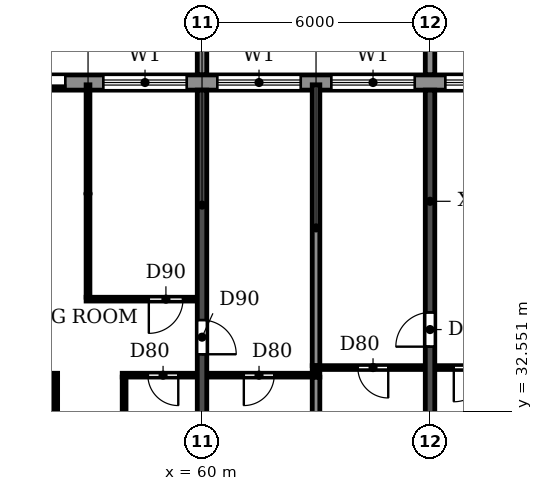
"""IFC4 building model, lengths in metres.
Left out: names, types, materials, properties, quantities, classifications, styles, units other than length and angle.
Written with IfcOpenShell. Run it as: python <this file> out.ifc"""

import sys

from ifc_helpers import new_model, si_unit, direction, frame, frame_2d, origin, place, context, subcontext, project, spatial, polyline, rectangle, outline, extrude, source, transform, mapped, element, fill, save


model = new_model("IFC4")
c1 = context("Model", 3, precision=1e-05, world=origin(), true_north=direction((0.0, 1.0)))
c2 = subcontext(c1, "Body", "Model", "MODEL_VIEW")
j1 = project(units=[si_unit("LENGTHUNIT", "METRE"), si_unit("PLANEANGLEUNIT", "RADIAN")], contexts=[c1])
p1 = place(None, origin())
s1 = spatial("IfcSite", under=j1, at=p1, CompositionType="ELEMENT")
p2 = place(p1, origin())
s2 = spatial("IfcBuilding", under=s1, at=p2, CompositionType="ELEMENT")
p3 = place(p2, frame((0.0, 0.0, 257.7)))
s3 = spatial("IfcBuildingStorey", under=s2, at=p3, CompositionType="ELEMENT", Elevation=257.7)
p4 = place(p3, frame((60.0, 30.5, 0.0), z_axis=(0.0, 0.0, 1.0), x_axis=(0.0, 1.0, 0.0)))
e1 = element("IfcWall", 1, at=p4, inside=s3, PredefinedType="SHEAR", context=c2, shape_type="SweptSolid", body=[
    extrude(rectangle(XDim=10.5, YDim=0.25, at=frame_2d((5.25, 0.0))), origin(), (0.0, 0.0, 1.0), 3.0),
])
p5 = place(p4, frame((3.55, 0.0, 0.0)))
e2 = element("IfcOpeningElement", 2, at=p5, cuts=e1, PredefinedType="OPENING", context=c2, shape_type="SweptSolid", body=[
    extrude(rectangle(XDim=0.9, YDim=2.1, at=frame_2d((0.45, 1.05))), frame((0.0, 0.135, 0.0), z_axis=(0.0, -1.0, 0.0), x_axis=(1.0, 0.0, 0.0)), (0.0, 0.0, 1.0), 0.27),
])
p6 = place(p3, frame((66.0, 30.5, 0.0), z_axis=(0.0, 0.0, 1.0), x_axis=(0.0, 1.0, 0.0)))
e3 = element("IfcWall", 3, at=p6, inside=s3, PredefinedType="SHEAR", context=c2, shape_type="SweptSolid", body=[
    extrude(rectangle(XDim=10.5, YDim=0.25, at=frame_2d((5.25, 0.0))), origin(), (0.0, 0.0, 1.0), 3.0),
])
p7 = place(p6, frame((3.75, 0.0, 0.0)))
e4 = element("IfcOpeningElement", 4, at=p7, cuts=e3, PredefinedType="OPENING", context=c2, shape_type="SweptSolid", body=[
    extrude(rectangle(XDim=0.9, YDim=2.1, at=frame_2d((0.45, 1.05))), frame((0.0, 0.135, 0.0), z_axis=(0.0, -1.0, 0.0), x_axis=(1.0, 0.0, 0.0)), (0.0, 0.0, 1.0), 0.27),
])
p8 = place(p3, frame((79.317, 41.2, 0.0), z_axis=(0.0, 0.0, 1.0), x_axis=(-1.0, 0.0, 0.0)))
e5 = element("IfcWall", 5, at=p8, inside=s3, PredefinedType="STANDARD", context=c2, shape_type="SweptSolid", body=[
    extrude(rectangle(XDim=56.634, YDim=0.4, at=frame_2d((28.317, 0.0))), origin(), (0.0, 0.0, 1.0), 3.0),
])
p9 = place(p8, frame((52.717, 0.0, 0.9)))
e6 = element("IfcOpeningElement", 6, at=p9, cuts=e5, PredefinedType="OPENING", context=c2, shape_type="SweptSolid", body=[
    extrude(rectangle(XDim=2.2, YDim=1.5, at=frame_2d((1.1, 0.75))), frame((0.0, 0.21, 0.0), z_axis=(0.0, -1.0, 0.0), x_axis=(1.0, 0.0, 0.0)), (0.0, 0.0, 1.0), 0.42),
])
p10 = place(p8, frame((49.717, 0.0, 0.9)))
e7 = element("IfcOpeningElement", 7, at=p10, cuts=e5, PredefinedType="OPENING", context=c2, shape_type="SweptSolid", body=[
    extrude(rectangle(XDim=2.2, YDim=1.5, at=frame_2d((1.1, 0.75))), frame((0.0, 0.21, 0.0), z_axis=(0.0, -1.0, 0.0), x_axis=(1.0, 0.0, 0.0)), (0.0, 0.0, 1.0), 0.42),
])
p11 = place(p8, frame((46.717, 0.0, 0.9)))
e8 = element("IfcOpeningElement", 8, at=p11, cuts=e5, PredefinedType="OPENING", context=c2, shape_type="SweptSolid", body=[
    extrude(rectangle(XDim=2.2, YDim=1.5, at=frame_2d((1.1, 0.75))), frame((0.0, 0.21, 0.0), z_axis=(0.0, -1.0, 0.0), x_axis=(1.0, 0.0, 0.0)), (0.0, 0.0, 1.0), 0.42),
])
p12 = place(p8, frame((43.917, 0.0, 0.0)))
e9 = element("IfcOpeningElement", 9, at=p12, cuts=e5, PredefinedType="OPENING", context=c2, shape_type="SweptSolid", body=[
    extrude(rectangle(XDim=1.8, YDim=2.4, at=frame_2d((0.9, 1.2))), frame((0.0, 0.21, 0.0), z_axis=(0.0, -1.0, 0.0), x_axis=(1.0, 0.0, 0.0)), (0.0, 0.0, 1.0), 0.42),
])
p13 = place(p8, frame((40.717, 0.0, 0.9)))
e10 = element("IfcOpeningElement", 10, at=p13, cuts=e5, PredefinedType="OPENING", context=c2, shape_type="SweptSolid", body=[
    extrude(rectangle(XDim=2.2, YDim=1.5, at=frame_2d((1.1, 0.75))), frame((0.0, 0.21, 0.0), z_axis=(0.0, -1.0, 0.0), x_axis=(1.0, 0.0, 0.0)), (0.0, 0.0, 1.0), 0.42),
])
p14 = place(p8, frame((37.917, 0.0, 0.0)))
e11 = element("IfcOpeningElement", 11, at=p14, cuts=e5, PredefinedType="OPENING", context=c2, shape_type="SweptSolid", body=[
    extrude(rectangle(XDim=1.8, YDim=2.4, at=frame_2d((0.9, 1.2))), frame((0.0, 0.21, 0.0), z_axis=(0.0, -1.0, 0.0), x_axis=(1.0, 0.0, 0.0)), (0.0, 0.0, 1.0), 0.42),
])
p15 = place(p8, frame((34.717, 0.0, 0.9)))
e12 = element("IfcOpeningElement", 12, at=p15, cuts=e5, PredefinedType="OPENING", context=c2, shape_type="SweptSolid", body=[
    extrude(rectangle(XDim=2.2, YDim=1.5, at=frame_2d((1.1, 0.75))), frame((0.0, 0.21, 0.0), z_axis=(0.0, -1.0, 0.0), x_axis=(1.0, 0.0, 0.0)), (0.0, 0.0, 1.0), 0.42),
])
p16 = place(p8, frame((31.717, 0.0, 0.9)))
e13 = element("IfcOpeningElement", 13, at=p16, cuts=e5, PredefinedType="OPENING", context=c2, shape_type="SweptSolid", body=[
    extrude(rectangle(XDim=2.2, YDim=1.5, at=frame_2d((1.1, 0.75))), frame((0.0, 0.21, 0.0), z_axis=(0.0, -1.0, 0.0), x_axis=(1.0, 0.0, 0.0)), (0.0, 0.0, 1.0), 0.42),
])
p17 = place(p8, frame((28.717, 0.0, 0.9)))
e14 = element("IfcOpeningElement", 14, at=p17, cuts=e5, PredefinedType="OPENING", context=c2, shape_type="SweptSolid", body=[
    extrude(rectangle(XDim=2.2, YDim=1.5, at=frame_2d((1.1, 0.75))), frame((0.0, 0.21, 0.0), z_axis=(0.0, -1.0, 0.0), x_axis=(1.0, 0.0, 0.0)), (0.0, 0.0, 1.0), 0.42),
])
p18 = place(p8, frame((25.917, 0.0, 0.0)))
e15 = element("IfcOpeningElement", 15, at=p18, cuts=e5, PredefinedType="OPENING", context=c2, shape_type="SweptSolid", body=[
    extrude(rectangle(XDim=1.8, YDim=2.4, at=frame_2d((0.9, 1.2))), frame((0.0, 0.21, 0.0), z_axis=(0.0, -1.0, 0.0), x_axis=(1.0, 0.0, 0.0)), (0.0, 0.0, 1.0), 0.42),
])
p19 = place(p8, frame((22.917, 0.0, 0.0)))
e16 = element("IfcOpeningElement", 16, at=p19, cuts=e5, PredefinedType="OPENING", context=c2, shape_type="SweptSolid", body=[
    extrude(rectangle(XDim=1.8, YDim=2.4, at=frame_2d((0.9, 1.2))), frame((0.0, 0.21, 0.0), z_axis=(0.0, -1.0, 0.0), x_axis=(1.0, 0.0, 0.0)), (0.0, 0.0, 1.0), 0.42),
])
p20 = place(p8, frame((19.717, 0.0, 0.9)))
e17 = element("IfcOpeningElement", 17, at=p20, cuts=e5, PredefinedType="OPENING", context=c2, shape_type="SweptSolid", body=[
    extrude(rectangle(XDim=2.2, YDim=1.5, at=frame_2d((1.1, 0.75))), frame((0.0, 0.21, 0.0), z_axis=(0.0, -1.0, 0.0), x_axis=(1.0, 0.0, 0.0)), (0.0, 0.0, 1.0), 0.42),
])
p21 = place(p8, frame((16.717, 0.0, 0.9)))
e18 = element("IfcOpeningElement", 18, at=p21, cuts=e5, PredefinedType="OPENING", context=c2, shape_type="SweptSolid", body=[
    extrude(rectangle(XDim=2.2, YDim=1.5, at=frame_2d((1.1, 0.75))), frame((0.0, 0.21, 0.0), z_axis=(0.0, -1.0, 0.0), x_axis=(1.0, 0.0, 0.0)), (0.0, 0.0, 1.0), 0.42),
])
p22 = place(p8, frame((13.717, 0.0, 0.9)))
e19 = element("IfcOpeningElement", 19, at=p22, cuts=e5, PredefinedType="OPENING", context=c2, shape_type="SweptSolid", body=[
    extrude(rectangle(XDim=2.2, YDim=1.5, at=frame_2d((1.1, 0.75))), frame((0.0, 0.21, 0.0), z_axis=(0.0, -1.0, 0.0), x_axis=(1.0, 0.0, 0.0)), (0.0, 0.0, 1.0), 0.42),
])
p23 = place(p8, frame((10.717, 0.0, 0.9)))
e20 = element("IfcOpeningElement", 20, at=p23, cuts=e5, PredefinedType="OPENING", context=c2, shape_type="SweptSolid", body=[
    extrude(rectangle(XDim=2.2, YDim=1.5, at=frame_2d((1.1, 0.75))), frame((0.0, 0.21, 0.0), z_axis=(0.0, -1.0, 0.0), x_axis=(1.0, 0.0, 0.0)), (0.0, 0.0, 1.0), 0.42),
])
p24 = place(p8, frame((7.917, 0.0, 0.0)))
e21 = element("IfcOpeningElement", 21, at=p24, cuts=e5, PredefinedType="OPENING", context=c2, shape_type="SweptSolid", body=[
    extrude(rectangle(XDim=1.8, YDim=2.4, at=frame_2d((0.9, 1.2))), frame((0.0, 0.21, 0.0), z_axis=(0.0, -1.0, 0.0), x_axis=(1.0, 0.0, 0.0)), (0.0, 0.0, 1.0), 0.42),
])
p25 = place(p8, frame((4.717, 0.0, 0.9)))
e22 = element("IfcOpeningElement", 22, at=p25, cuts=e5, PredefinedType="OPENING", context=c2, shape_type="SweptSolid", body=[
    extrude(rectangle(XDim=2.2, YDim=1.5, at=frame_2d((1.1, 0.75))), frame((0.0, 0.21, 0.0), z_axis=(0.0, -1.0, 0.0), x_axis=(1.0, 0.0, 0.0)), (0.0, 0.0, 1.0), 0.42),
])
p26 = place(p8, frame((1.917, 0.0, 0.0)))
e23 = element("IfcOpeningElement", 23, at=p26, cuts=e5, PredefinedType="OPENING", context=c2, shape_type="SweptSolid", body=[
    extrude(rectangle(XDim=1.8, YDim=2.4, at=frame_2d((0.9, 1.2))), frame((0.0, 0.21, 0.0), z_axis=(0.0, -1.0, 0.0), x_axis=(1.0, 0.0, 0.0)), (0.0, 0.0, 1.0), 0.42),
])
m1 = source(origin(), c2, "Body", "SweptSolid", [
    extrude(outline(polyline([(0.0, 0.0), (0.25, 0.0), (0.25, 3.1), (0.0, 3.1), (0.0, 0.0)])), origin(), (0.0, 0.0, 1.0), 3.1),
])
for number, where in (
    (24, (59.875, 41.4, 0.0)),
    (25, (65.875, 41.4, 0.0)),
):
    element("IfcWall", number, at=place(p3, frame(where)), inside=s3, PredefinedType="STANDARD", context=c2, shape_type="MappedRepresentation", body=[
        mapped(m1, transform((0.0, 0.0, 0.0))),
    ])
p27 = place(p3, frame((63.0, 30.51, 0.0), z_axis=(0.0, 0.0, 1.0), x_axis=(0.0, 1.0, 0.0)))
e26 = element("IfcWall", 26, at=p27, inside=s3, PredefinedType="PARTITIONING", context=c2, shape_type="SweptSolid", body=[
    extrude(rectangle(XDim=2.94, YDim=0.2, at=frame_2d((1.47, 0.0))), origin(), (0.0, 0.0, 1.0), 3.0),
])
p28 = place(p3, frame((63.0, 33.75, 0.0), z_axis=(0.0, 0.0, 1.0), x_axis=(0.0, 1.0, 0.0)))
e27 = element("IfcWall", 27, at=p28, inside=s3, PredefinedType="PARTITIONING", context=c2, shape_type="SweptSolid", body=[
    extrude(rectangle(XDim=7.39, YDim=0.2, at=frame_2d((3.695, 0.0))), origin(), (0.0, 0.0, 1.0), 3.0),
])
p29 = place(p3, frame((54.135, 33.5, 0.0), z_axis=(0.0, 0.0, 1.0), x_axis=(1.0, 0.0, 0.0)))
e28 = element("IfcWall", 28, at=p29, inside=s3, PredefinedType="PARTITIONING", context=c2, shape_type="SweptSolid", body=[
    extrude(rectangle(XDim=2.065, YDim=0.1, at=frame_2d((1.032, 0.0))), origin(), (0.0, 0.0, 1.0), 3.0),
])
p30 = place(p29, frame((0.49, 0.0, 0.0)))
e29 = element("IfcOpeningElement", 29, at=p30, cuts=e28, PredefinedType="OPENING", context=c2, shape_type="SweptSolid", body=[
    extrude(rectangle(XDim=0.9, YDim=2.1, at=frame_2d((0.45, 1.05))), frame((0.0, 0.06, 0.0), z_axis=(0.0, -1.0, 0.0), x_axis=(1.0, 0.0, 0.0)), (0.0, 0.0, 1.0), 0.12),
])
p31 = place(p3, frame((57.9, 33.5, 0.0), z_axis=(0.0, 0.0, 1.0), x_axis=(1.0, 0.0, 0.0)))
e30 = element("IfcWall", 30, at=p31, inside=s3, PredefinedType="PARTITIONING", context=c2, shape_type="SweptSolid", body=[
    extrude(rectangle(XDim=1.965, YDim=0.1, at=frame_2d((0.982, 0.0))), origin(), (0.0, 0.0, 1.0), 3.0),
])
p32 = place(p31, frame((0.675, 0.0, 0.0)))
e31 = element("IfcOpeningElement", 31, at=p32, cuts=e30, PredefinedType="OPENING", context=c2, shape_type="SweptSolid", body=[
    extrude(rectangle(XDim=0.8, YDim=2.1, at=frame_2d((0.4, 1.05))), frame((0.0, 0.06, 0.0), z_axis=(0.0, -1.0, 0.0), x_axis=(1.0, 0.0, 0.0)), (0.0, 0.0, 1.0), 0.12),
])
p33 = place(p3, frame((60.135, 33.5, 0.0), z_axis=(0.0, 0.0, 1.0), x_axis=(1.0, 0.0, 0.0)))
e32 = element("IfcWall", 32, at=p33, inside=s3, PredefinedType="PARTITIONING", context=c2, shape_type="SweptSolid", body=[
    extrude(rectangle(XDim=2.965, YDim=0.1, at=frame_2d((1.482, 0.0))), origin(), (0.0, 0.0, 1.0), 3.0),
])
p34 = place(p33, frame((0.965, 0.0, 0.0)))
e33 = element("IfcOpeningElement", 33, at=p34, cuts=e32, PredefinedType="OPENING", context=c2, shape_type="SweptSolid", body=[
    extrude(rectangle(XDim=0.8, YDim=2.1, at=frame_2d((0.4, 1.05))), frame((0.0, 0.06, 0.0), z_axis=(0.0, -1.0, 0.0), x_axis=(1.0, 0.0, 0.0)), (0.0, 0.0, 1.0), 0.12),
])
p35 = place(p3, frame((62.9, 33.7, 0.0), z_axis=(0.0, 0.0, 1.0), x_axis=(1.0, 0.0, 0.0)))
e34 = element("IfcWall", 34, at=p35, inside=s3, PredefinedType="PARTITIONING", context=c2, shape_type="SweptSolid", body=[
    extrude(rectangle(XDim=2.965, YDim=0.1, at=frame_2d((1.482, 0.0))), origin(), (0.0, 0.0, 1.0), 3.0),
])
p36 = place(p35, frame((1.2, 0.0, 0.0)))
e35 = element("IfcOpeningElement", 35, at=p36, cuts=e34, PredefinedType="OPENING", context=c2, shape_type="SweptSolid", body=[
    extrude(rectangle(XDim=0.8, YDim=2.1, at=frame_2d((0.4, 1.05))), frame((0.0, 0.06, 0.0), z_axis=(0.0, -1.0, 0.0), x_axis=(1.0, 0.0, 0.0)), (0.0, 0.0, 1.0), 0.12),
])
p37 = place(p3, frame((66.135, 33.7, 0.0), z_axis=(0.0, 0.0, 1.0), x_axis=(1.0, 0.0, 0.0)))
e36 = element("IfcWall", 36, at=p37, inside=s3, PredefinedType="PARTITIONING", context=c2, shape_type="SweptSolid", body=[
    extrude(rectangle(XDim=2.065, YDim=0.1, at=frame_2d((1.032, 0.0))), origin(), (0.0, 0.0, 1.0), 3.0),
])
p38 = place(p37, frame((0.49, 0.0, 0.0)))
e37 = element("IfcOpeningElement", 37, at=p38, cuts=e36, PredefinedType="OPENING", context=c2, shape_type="SweptSolid", body=[
    extrude(rectangle(XDim=0.9, YDim=2.1, at=frame_2d((0.45, 1.05))), frame((0.0, 0.06, 0.0), z_axis=(0.0, -1.0, 0.0), x_axis=(1.0, 0.0, 0.0)), (0.0, 0.0, 1.0), 0.12),
])
p39 = place(p3, frame((56.95, 35.5, 0.0), z_axis=(0.0, 0.0, 1.0), x_axis=(1.0, 0.0, 0.0)))
e38 = element("IfcWall", 38, at=p39, inside=s3, PredefinedType="PARTITIONING", context=c2, shape_type="SweptSolid", body=[
    extrude(rectangle(XDim=2.915, YDim=0.1, at=frame_2d((1.458, 0.0))), origin(), (0.0, 0.0, 1.0), 3.0),
])
p40 = place(p39, frame((1.65, 0.0, 0.0)))
e39 = element("IfcOpeningElement", 39, at=p40, cuts=e38, PredefinedType="OPENING", context=c2, shape_type="SweptSolid", body=[
    extrude(rectangle(XDim=0.9, YDim=2.1, at=frame_2d((0.45, 1.05))), frame((0.0, 0.06, 0.0), z_axis=(0.0, -1.0, 0.0), x_axis=(1.0, 0.0, 0.0)), (0.0, 0.0, 1.0), 0.12),
])
p41 = place(p3, frame((56.15, 30.51, 0.0), z_axis=(0.0, 0.0, 1.0), x_axis=(0.0, 1.0, 0.0)))
e40 = element("IfcWall", 40, at=p41, inside=s3, PredefinedType="PARTITIONING", context=c2, shape_type="SweptSolid", body=[
    extrude(rectangle(XDim=2.94, YDim=0.1, at=frame_2d((1.47, 0.0))), origin(), (0.0, 0.0, 1.0), 3.0),
])
p42 = place(p3, frame((57.0, 35.55, 0.0), z_axis=(0.0, 0.0, 1.0), x_axis=(0.0, 1.0, 0.0)))
e41 = element("IfcWall", 41, at=p42, inside=s3, PredefinedType="PARTITIONING", context=c2, shape_type="SweptSolid", body=[
    extrude(rectangle(XDim=5.59, YDim=0.1, at=frame_2d((2.795, 0.0))), origin(), (0.0, 0.0, 1.0), 3.0),
])
p43 = place(p3, frame((57.95, 30.51, 0.0), z_axis=(0.0, 0.0, 1.0), x_axis=(0.0, 1.0, 0.0)))
e42 = element("IfcWall", 42, at=p43, inside=s3, PredefinedType="PARTITIONING", context=c2, shape_type="SweptSolid", body=[
    extrude(rectangle(XDim=2.94, YDim=0.1, at=frame_2d((1.47, 0.0))), origin(), (0.0, 0.0, 1.0), 3.0),
])
p44 = place(p19, origin())
e43 = element("IfcDoor", 43, at=p44, inside=s3, OperationType="DOUBLE_DOOR_SLIDING", PredefinedType="DOOR", context=c2, shape_type="SweptSolid", body=[
    extrude(rectangle(XDim=1.8, YDim=2.4, at=frame_2d((0.9, 1.2))), frame((0.0, 0.025, 0.0), z_axis=(0.0, -1.0, 0.0), x_axis=(1.0, 0.0, 0.0)), (0.0, 0.0, 1.0), 0.05),
])
fill(e16, e43)
p45 = place(p20, origin())
e44 = element("IfcWindow", 44, at=p45, inside=s3, PartitioningType="DOUBLE_PANEL_HORIZONTAL", PredefinedType="WINDOW", context=c2, shape_type="SweptSolid", body=[
    extrude(rectangle(XDim=2.2, YDim=1.5, at=frame_2d((1.1, 0.75))), frame((0.0, 0.03, 0.0), z_axis=(0.0, -1.0, 0.0), x_axis=(1.0, 0.0, 0.0)), (0.0, 0.0, 1.0), 0.06),
])
fill(e17, e44)
p46 = place(p21, origin())
e45 = element("IfcWindow", 45, at=p46, inside=s3, PartitioningType="DOUBLE_PANEL_HORIZONTAL", PredefinedType="WINDOW", context=c2, shape_type="SweptSolid", body=[
    extrude(rectangle(XDim=2.2, YDim=1.5, at=frame_2d((1.1, 0.75))), frame((0.0, 0.03, 0.0), z_axis=(0.0, -1.0, 0.0), x_axis=(1.0, 0.0, 0.0)), (0.0, 0.0, 1.0), 0.06),
])
fill(e18, e45)
p47 = place(p22, origin())
e46 = element("IfcWindow", 46, at=p47, inside=s3, PartitioningType="DOUBLE_PANEL_HORIZONTAL", PredefinedType="WINDOW", context=c2, shape_type="SweptSolid", body=[
    extrude(rectangle(XDim=2.2, YDim=1.5, at=frame_2d((1.1, 0.75))), frame((0.0, 0.03, 0.0), z_axis=(0.0, -1.0, 0.0), x_axis=(1.0, 0.0, 0.0)), (0.0, 0.0, 1.0), 0.06),
])
fill(e19, e46)
p48 = place(p23, origin())
e47 = element("IfcWindow", 47, at=p48, inside=s3, PartitioningType="DOUBLE_PANEL_HORIZONTAL", PredefinedType="WINDOW", context=c2, shape_type="SweptSolid", body=[
    extrude(rectangle(XDim=2.2, YDim=1.5, at=frame_2d((1.1, 0.75))), frame((0.0, 0.03, 0.0), z_axis=(0.0, -1.0, 0.0), x_axis=(1.0, 0.0, 0.0)), (0.0, 0.0, 1.0), 0.06),
])
fill(e20, e47)
p49 = place(p34, frame((0.8, 0.0, 0.0), z_axis=(0.0, 0.0, 1.0), x_axis=(-1.0, 0.0, 0.0)))
e48 = element("IfcDoor", 48, at=p49, inside=s3, OperationType="SINGLE_SWING_RIGHT", PredefinedType="DOOR", context=c2, shape_type="SweptSolid", body=[
    extrude(rectangle(XDim=0.8, YDim=2.1, at=frame_2d((0.4, 1.05))), frame((0.0, 0.025, 0.0), z_axis=(0.0, -1.0, 0.0), x_axis=(1.0, 0.0, 0.0)), (0.0, 0.0, 1.0), 0.05),
])
fill(e33, e48)
p50 = place(p32, frame((0.8, 0.0, 0.0), z_axis=(0.0, 0.0, 1.0), x_axis=(-1.0, 0.0, 0.0)))
e49 = element("IfcDoor", 49, at=p50, inside=s3, OperationType="SINGLE_SWING_LEFT", PredefinedType="DOOR", context=c2, shape_type="SweptSolid", body=[
    extrude(rectangle(XDim=0.8, YDim=2.1, at=frame_2d((0.4, 1.05))), frame((0.0, 0.025, 0.0), z_axis=(0.0, -1.0, 0.0), x_axis=(1.0, 0.0, 0.0)), (0.0, 0.0, 1.0), 0.05),
])
fill(e31, e49)
p51 = place(p40, frame((0.9, 0.0, 0.0), z_axis=(0.0, 0.0, 1.0), x_axis=(-1.0, 0.0, 0.0)))
e50 = element("IfcDoor", 50, at=p51, inside=s3, OperationType="SINGLE_SWING_RIGHT", PredefinedType="DOOR", context=c2, shape_type="SweptSolid", body=[
    extrude(rectangle(XDim=0.9, YDim=2.1, at=frame_2d((0.45, 1.05))), frame((0.0, 0.025, 0.0), z_axis=(0.0, -1.0, 0.0), x_axis=(1.0, 0.0, 0.0)), (0.0, 0.0, 1.0), 0.05),
])
fill(e39, e50)
p52 = place(p5, frame((0.9, 0.0, 0.0), z_axis=(0.0, 0.0, 1.0), x_axis=(-1.0, 0.0, 0.0)))
e51 = element("IfcDoor", 51, at=p52, inside=s3, OperationType="SINGLE_SWING_RIGHT", PredefinedType="DOOR", context=c2, shape_type="SweptSolid", body=[
    extrude(rectangle(XDim=0.9, YDim=2.1, at=frame_2d((0.45, 1.05))), frame((0.0, 0.025, 0.0), z_axis=(0.0, -1.0, 0.0), x_axis=(1.0, 0.0, 0.0)), (0.0, 0.0, 1.0), 0.05),
])
fill(e2, e51)
p53 = place(p36, frame((0.8, 0.0, 0.0), z_axis=(0.0, 0.0, 1.0), x_axis=(-1.0, 0.0, 0.0)))
e52 = element("IfcDoor", 52, at=p53, inside=s3, OperationType="SINGLE_SWING_LEFT", PredefinedType="DOOR", context=c2, shape_type="SweptSolid", body=[
    extrude(rectangle(XDim=0.8, YDim=2.1, at=frame_2d((0.4, 1.05))), frame((0.0, 0.025, 0.0), z_axis=(0.0, -1.0, 0.0), x_axis=(1.0, 0.0, 0.0)), (0.0, 0.0, 1.0), 0.05),
])
fill(e35, e52)
p54 = place(p7, origin())
e53 = element("IfcDoor", 53, at=p54, inside=s3, OperationType="SINGLE_SWING_LEFT", PredefinedType="DOOR", context=c2, shape_type="SweptSolid", body=[
    extrude(rectangle(XDim=0.9, YDim=2.1, at=frame_2d((0.45, 1.05))), frame((0.0, 0.025, 0.0), z_axis=(0.0, -1.0, 0.0), x_axis=(1.0, 0.0, 0.0)), (0.0, 0.0, 1.0), 0.05),
])
fill(e4, e53)
p55 = place(p38, frame((0.9, 0.0, 0.0), z_axis=(0.0, 0.0, 1.0), x_axis=(-1.0, 0.0, 0.0)))
e54 = element("IfcDoor", 54, at=p55, inside=s3, OperationType="SINGLE_SWING_RIGHT", PredefinedType="DOOR", context=c2, shape_type="SweptSolid", body=[
    extrude(rectangle(XDim=0.9, YDim=2.1, at=frame_2d((0.45, 1.05))), frame((0.0, 0.025, 0.0), z_axis=(0.0, -1.0, 0.0), x_axis=(1.0, 0.0, 0.0)), (0.0, 0.0, 1.0), 0.05),
])
fill(e37, e54)
save(model, sys.argv[1])
